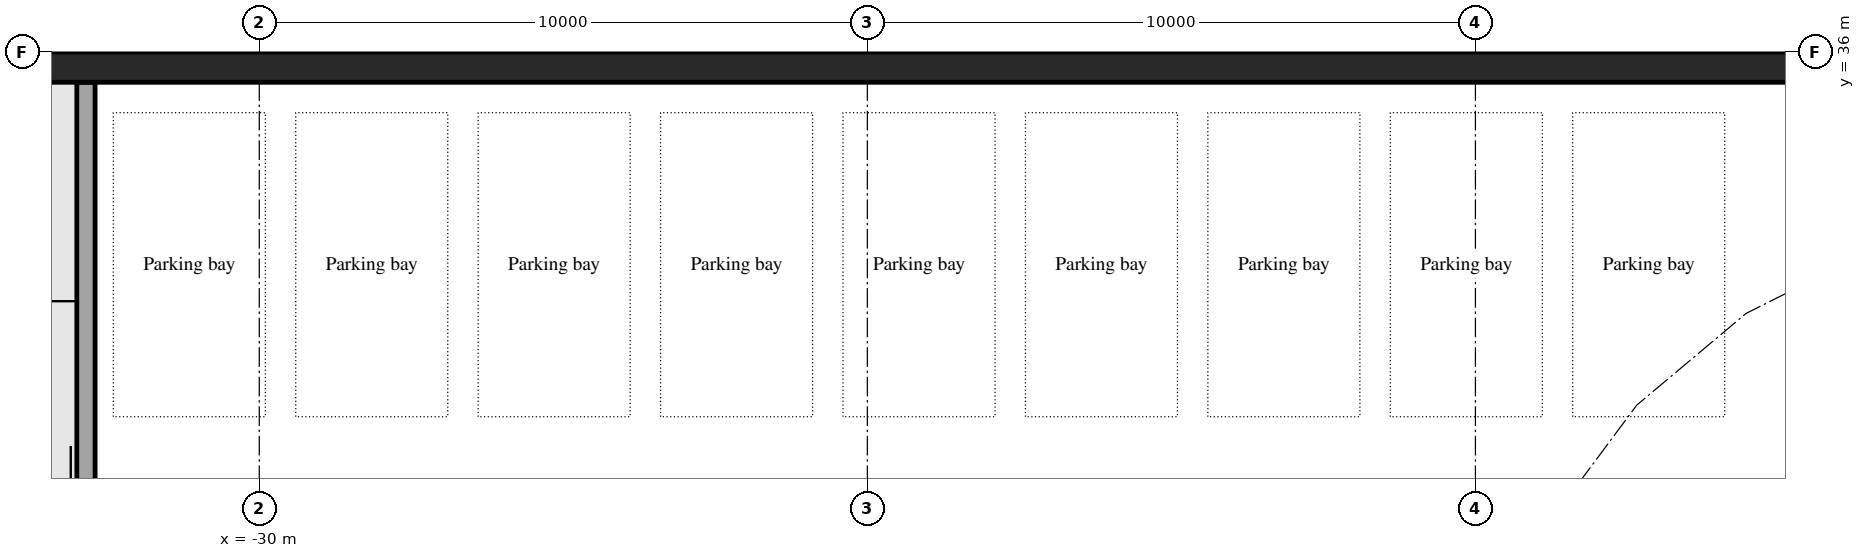
"""IFC4 building model, lengths in metres.
Left out: names, types, materials, properties, quantities, classifications, styles, units other than length and angle.
Written with IfcOpenShell. Run it as: python <this file> out.ifc"""

import sys

from ifc_helpers import new_model, si_unit, direction, frame, frame_2d, origin, place, context, subcontext, project, spatial, rectangle, extrude, element, save


model = new_model("IFC4")
c1 = context("Model", 3, precision=1e-05, world=origin(), true_north=direction((0.0, 1.0)))
c2 = subcontext(c1, "Body", "Model", "MODEL_VIEW")
j1 = project(units=[si_unit("LENGTHUNIT", "METRE"), si_unit("PLANEANGLEUNIT", "RADIAN")], contexts=[c1])
p1 = place(None, origin())
s1 = spatial("IfcSite", under=j1, at=p1, CompositionType="ELEMENT")
p2 = place(p1, origin())
s2 = spatial("IfcBuilding", under=s1, at=p2, CompositionType="ELEMENT")
p3 = place(p2, frame((0.0, 0.0, -4.2)))
s3 = spatial("IfcBuildingStorey", under=s2, at=p3, CompositionType="ELEMENT", Elevation=-4.2)
p4 = place(p3, frame((40.0, 35.75, -0.38), z_axis=(0.0, 0.0, 1.0), x_axis=(-1.0, 0.0, 0.0)))
e1 = element("IfcWall", 1, at=p4, inside=s3, PredefinedType="SOLIDWALL", context=c2, shape_type="SweptSolid", body=[
    extrude(rectangle(XDim=80.0, YDim=0.5, at=frame_2d((40.0, 0.0))), origin(), (0.0, 0.0, 1.0), 3.88),
])
p5 = place(p3, frame((-32.85, 18.4, 0.0), z_axis=(0.0, 0.0, 1.0), x_axis=(0.0, 1.0, 0.0)))
e2 = element("IfcWall", 2, at=p5, inside=s3, PredefinedType="SOLIDWALL", context=c2, shape_type="SweptSolid", body=[
    extrude(rectangle(XDim=17.1, YDim=0.3, at=frame_2d((8.55, 0.0))), origin(), (0.0, 0.0, 1.0), 3.5),
])
save(model, sys.argv[1])
